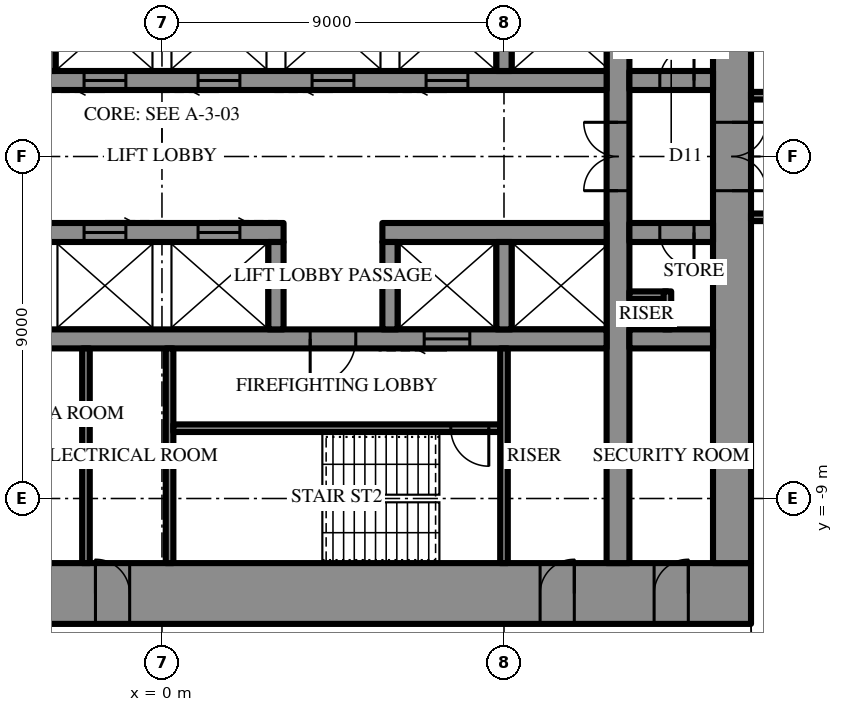
"""IFC4 building model, lengths in metres.
Left out: names, types, materials, properties, quantities, classifications, styles, units other than length and angle.
Written with IfcOpenShell. Run it as: python <this file> out.ifc"""

import sys

from ifc_helpers import new_model, si_unit, direction, frame, frame_2d, origin, place, context, subcontext, project, spatial, rectangle, extrude, element, fill, save


model = new_model("IFC4")
c1 = context("Model", 3, precision=1e-05, world=origin(), true_north=direction((0.0, 1.0)))
c2 = subcontext(c1, "Body", "Model", "MODEL_VIEW")
j1 = project(units=[si_unit("LENGTHUNIT", "METRE"), si_unit("PLANEANGLEUNIT", "RADIAN")], contexts=[c1])
p1 = place(None, origin())
s1 = spatial("IfcSite", under=j1, at=p1, CompositionType="ELEMENT")
p2 = place(p1, origin())
s2 = spatial("IfcBuilding", under=s1, at=p2, CompositionType="ELEMENT")
p3 = place(p2, frame((0.0, 0.0, 291.1)))
s3 = spatial("IfcBuildingStorey", under=s2, at=p3, CompositionType="ELEMENT", Elevation=291.1)
p4 = place(p3, frame((15.5, -11.5, 0.0), z_axis=(0.0, 0.0, 1.0), x_axis=(-1.0, 0.0, 0.0)))
e1 = element("IfcWall", 1, at=p4, inside=s3, PredefinedType="SHEAR", context=c2, shape_type="SweptSolid", body=[
    extrude(rectangle(XDim=31.0, YDim=1.6, at=frame_2d((15.5, 0.0))), origin(), (0.0, 0.0, 1.0), 4.2),
])
p5 = place(p4, frame((16.35, 0.0, 0.0)))
e2 = element("IfcOpeningElement", 2, at=p5, cuts=e1, PredefinedType="OPENING", context=c2, shape_type="SweptSolid", body=[
    extrude(rectangle(XDim=0.9, YDim=2.2, at=frame_2d((0.45, 1.1))), frame((0.0, 0.81, 0.0), z_axis=(0.0, -1.0, 0.0), x_axis=(1.0, 0.0, 0.0)), (0.0, 0.0, 1.0), 1.62),
])
p6 = place(p4, frame((19.35, 0.0, 0.0)))
e3 = element("IfcOpeningElement", 3, at=p6, cuts=e1, PredefinedType="OPENING", context=c2, shape_type="SweptSolid", body=[
    extrude(rectangle(XDim=0.9, YDim=2.2, at=frame_2d((0.45, 1.1))), frame((0.0, 0.81, 0.0), z_axis=(0.0, -1.0, 0.0), x_axis=(1.0, 0.0, 0.0)), (0.0, 0.0, 1.0), 1.62),
])
p7 = place(p4, frame((22.4, 0.0, 0.0)))
e4 = element("IfcOpeningElement", 4, at=p7, cuts=e1, PredefinedType="OPENING", context=c2, shape_type="SweptSolid", body=[
    extrude(rectangle(XDim=1.0, YDim=2.2, at=frame_2d((0.5, 1.1))), frame((0.0, 0.81, 0.0), z_axis=(0.0, -1.0, 0.0), x_axis=(1.0, 0.0, 0.0)), (0.0, 0.0, 1.0), 1.62),
])
p8 = place(p4, frame((1.65, 0.0, 0.0)))
e5 = element("IfcOpeningElement", 5, at=p8, cuts=e1, PredefinedType="OPENING", context=c2, shape_type="SweptSolid", body=[
    extrude(rectangle(XDim=0.9, YDim=2.2, at=frame_2d((0.45, 1.1))), frame((0.0, 0.81, 0.0), z_axis=(0.0, -1.0, 0.0), x_axis=(1.0, 0.0, 0.0)), (0.0, 0.0, 1.0), 1.62),
])
p9 = place(p4, frame((4.65, 0.0, 0.0)))
e6 = element("IfcOpeningElement", 6, at=p9, cuts=e1, PredefinedType="OPENING", context=c2, shape_type="SweptSolid", body=[
    extrude(rectangle(XDim=0.9, YDim=2.2, at=frame_2d((0.45, 1.1))), frame((0.0, 0.81, 0.0), z_axis=(0.0, -1.0, 0.0), x_axis=(1.0, 0.0, 0.0)), (0.0, 0.0, 1.0), 1.62),
])
p10 = place(p4, frame((25.45, 0.0, 0.0)))
e7 = element("IfcOpeningElement", 7, at=p10, cuts=e1, PredefinedType="OPENING", context=c2, shape_type="SweptSolid", body=[
    extrude(rectangle(XDim=0.9, YDim=2.2, at=frame_2d((0.45, 1.1))), frame((0.0, 0.81, 0.0), z_axis=(0.0, -1.0, 0.0), x_axis=(1.0, 0.0, 0.0)), (0.0, 0.0, 1.0), 1.62),
])
p11 = place(p4, frame((28.45, 0.0, 0.0)))
e8 = element("IfcOpeningElement", 8, at=p11, cuts=e1, PredefinedType="OPENING", context=c2, shape_type="SweptSolid", body=[
    extrude(rectangle(XDim=0.9, YDim=2.2, at=frame_2d((0.45, 1.1))), frame((0.0, 0.81, 0.0), z_axis=(0.0, -1.0, 0.0), x_axis=(1.0, 0.0, 0.0)), (0.0, 0.0, 1.0), 1.62),
])
p12 = place(p3, frame((15.0, -10.7, 0.0), z_axis=(0.0, 0.0, 1.0), x_axis=(0.0, 1.0, 0.0)))
e9 = element("IfcWall", 9, at=p12, inside=s3, PredefinedType="SHEAR", context=c2, shape_type="SweptSolid", body=[
    extrude(rectangle(XDim=21.4, YDim=1.0, at=frame_2d((10.7, 0.0))), origin(), (0.0, 0.0, 1.0), 4.2),
])
p13 = place(p12, frame((9.8, 0.0, 0.0)))
e10 = element("IfcOpeningElement", 10, at=p13, cuts=e9, PredefinedType="OPENING", context=c2, shape_type="SweptSolid", body=[
    extrude(rectangle(XDim=1.8, YDim=2.4, at=frame_2d((0.9, 1.2))), frame((0.0, 0.51, 0.0), z_axis=(0.0, -1.0, 0.0), x_axis=(1.0, 0.0, 0.0)), (0.0, 0.0, 1.0), 1.02),
])
p14 = place(p3, frame((12.0, -10.7, 0.0), z_axis=(0.0, 0.0, 1.0), x_axis=(0.0, 1.0, 0.0)))
e11 = element("IfcWall", 11, at=p14, inside=s3, PredefinedType="SHEAR", context=c2, shape_type="SweptSolid", body=[
    extrude(rectangle(XDim=21.4, YDim=0.6, at=frame_2d((10.7, 0.0))), origin(), (0.0, 0.0, 1.0), 4.2),
])
p15 = place(p14, frame((9.8, 0.0, 0.0)))
e12 = element("IfcOpeningElement", 12, at=p15, cuts=e11, PredefinedType="OPENING", context=c2, shape_type="SweptSolid", body=[
    extrude(rectangle(XDim=1.8, YDim=2.4, at=frame_2d((0.9, 1.2))), frame((0.0, 0.31, 0.0), z_axis=(0.0, -1.0, 0.0), x_axis=(1.0, 0.0, 0.0)), (0.0, 0.0, 1.0), 0.62),
])
p16 = place(p3, frame((-3.2, 2.0, 0.0), z_axis=(0.0, 0.0, 1.0), x_axis=(1.0, 0.0, 0.0)))
e13 = element("IfcWall", 13, at=p16, inside=s3, PredefinedType="SHEAR", context=c2, shape_type="SweptSolid", body=[
    extrude(rectangle(XDim=14.9, YDim=0.5, at=frame_2d((7.45, 0.0))), origin(), (0.0, 0.0, 1.0), 4.2),
])
p17 = place(p16, frame((1.15, 0.0, 0.0)))
e14 = element("IfcOpeningElement", 14, at=p17, cuts=e13, PredefinedType="OPENING", context=c2, shape_type="SweptSolid", body=[
    extrude(rectangle(XDim=1.1, YDim=2.2, at=frame_2d((0.55, 1.1))), frame((0.0, 0.26, 0.0), z_axis=(0.0, -1.0, 0.0), x_axis=(1.0, 0.0, 0.0)), (0.0, 0.0, 1.0), 0.52),
])
p18 = place(p16, frame((4.15, 0.0, 0.0)))
e15 = element("IfcOpeningElement", 15, at=p18, cuts=e13, PredefinedType="OPENING", context=c2, shape_type="SweptSolid", body=[
    extrude(rectangle(XDim=1.1, YDim=2.2, at=frame_2d((0.55, 1.1))), frame((0.0, 0.26, 0.0), z_axis=(0.0, -1.0, 0.0), x_axis=(1.0, 0.0, 0.0)), (0.0, 0.0, 1.0), 0.52),
])
p19 = place(p16, frame((7.15, 0.0, 0.0)))
e16 = element("IfcOpeningElement", 16, at=p19, cuts=e13, PredefinedType="OPENING", context=c2, shape_type="SweptSolid", body=[
    extrude(rectangle(XDim=1.1, YDim=2.2, at=frame_2d((0.55, 1.1))), frame((0.0, 0.26, 0.0), z_axis=(0.0, -1.0, 0.0), x_axis=(1.0, 0.0, 0.0)), (0.0, 0.0, 1.0), 0.52),
])
p20 = place(p16, frame((10.15, 0.0, 0.0)))
e17 = element("IfcOpeningElement", 17, at=p20, cuts=e13, PredefinedType="OPENING", context=c2, shape_type="SweptSolid", body=[
    extrude(rectangle(XDim=1.1, YDim=2.2, at=frame_2d((0.55, 1.1))), frame((0.0, 0.26, 0.0), z_axis=(0.0, -1.0, 0.0), x_axis=(1.0, 0.0, 0.0)), (0.0, 0.0, 1.0), 0.52),
])
p21 = place(p3, frame((12.3, 2.0, 0.0), z_axis=(0.0, 0.0, 1.0), x_axis=(1.0, 0.0, 0.0)))
e18 = element("IfcWall", 18, at=p21, inside=s3, PredefinedType="SHEAR", context=c2, shape_type="SweptSolid", body=[
    extrude(rectangle(XDim=2.2, YDim=0.5, at=frame_2d((1.1, 0.0))), origin(), (0.0, 0.0, 1.0), 4.2),
])
p22 = place(p21, frame((0.8, 0.0, 0.0)))
e19 = element("IfcOpeningElement", 19, at=p22, cuts=e18, PredefinedType="OPENING", context=c2, shape_type="SweptSolid", body=[
    extrude(rectangle(XDim=0.9, YDim=2.2, at=frame_2d((0.45, 1.1))), frame((0.0, 0.26, 0.0), z_axis=(0.0, -1.0, 0.0), x_axis=(1.0, 0.0, 0.0)), (0.0, 0.0, 1.0), 0.52),
])
for number, where, z_axis, x_axis in (
    (20, (-3.0, 2.25, 0.0), (0.0, 0.0, 1.0), (0.0, 1.0, 0.0)),
    (21, (9.0, 2.25, 0.0), (0.0, 0.0, 1.0), (0.0, 1.0, 0.0)),
):
    element("IfcWall", number, at=place(p3, frame(where, z_axis=z_axis, x_axis=x_axis)), inside=s3, PredefinedType="SHEAR", context=c2, shape_type="SweptSolid", body=[
        extrude(rectangle(XDim=2.3, YDim=0.4, at=frame_2d((1.15, 0.0))), origin(), (0.0, 0.0, 1.0), 4.2),
    ])
p23 = place(p3, frame((14.5, -2.0, 0.0), z_axis=(0.0, 0.0, 1.0), x_axis=(-1.0, 0.0, 0.0)))
e22 = element("IfcWall", 22, at=p23, inside=s3, PredefinedType="SHEAR", context=c2, shape_type="SweptSolid", body=[
    extrude(rectangle(XDim=2.2, YDim=0.5, at=frame_2d((1.1, 0.0))), origin(), (0.0, 0.0, 1.0), 4.2),
])
p24 = place(p23, frame((0.5, 0.0, 0.0)))
e23 = element("IfcOpeningElement", 23, at=p24, cuts=e22, PredefinedType="OPENING", context=c2, shape_type="SweptSolid", body=[
    extrude(rectangle(XDim=0.9, YDim=2.2, at=frame_2d((0.45, 1.1))), frame((0.0, 0.26, 0.0), z_axis=(0.0, -1.0, 0.0), x_axis=(1.0, 0.0, 0.0)), (0.0, 0.0, 1.0), 0.52),
])
p25 = place(p3, frame((11.7, -2.0, 0.0), z_axis=(0.0, 0.0, 1.0), x_axis=(-1.0, 0.0, 0.0)))
e24 = element("IfcWall", 24, at=p25, inside=s3, PredefinedType="SHEAR", context=c2, shape_type="SweptSolid", body=[
    extrude(rectangle(XDim=5.9, YDim=0.5, at=frame_2d((2.95, 0.0))), origin(), (0.0, 0.0, 1.0), 4.2),
])
p26 = place(p3, frame((3.2, -2.0, 0.0), z_axis=(0.0, 0.0, 1.0), x_axis=(-1.0, 0.0, 0.0)))
e25 = element("IfcWall", 25, at=p26, inside=s3, PredefinedType="SHEAR", context=c2, shape_type="SweptSolid", body=[
    extrude(rectangle(XDim=14.9, YDim=0.5, at=frame_2d((7.45, 0.0))), origin(), (0.0, 0.0, 1.0), 4.2),
])
p27 = place(p26, frame((1.15, 0.0, 0.0)))
e26 = element("IfcOpeningElement", 26, at=p27, cuts=e25, PredefinedType="OPENING", context=c2, shape_type="SweptSolid", body=[
    extrude(rectangle(XDim=1.1, YDim=2.2, at=frame_2d((0.55, 1.1))), frame((0.0, 0.26, 0.0), z_axis=(0.0, -1.0, 0.0), x_axis=(1.0, 0.0, 0.0)), (0.0, 0.0, 1.0), 0.52),
])
p28 = place(p26, frame((4.15, 0.0, 0.0)))
e27 = element("IfcOpeningElement", 27, at=p28, cuts=e25, PredefinedType="OPENING", context=c2, shape_type="SweptSolid", body=[
    extrude(rectangle(XDim=1.1, YDim=2.2, at=frame_2d((0.55, 1.1))), frame((0.0, 0.26, 0.0), z_axis=(0.0, -1.0, 0.0), x_axis=(1.0, 0.0, 0.0)), (0.0, 0.0, 1.0), 0.52),
])
p29 = place(p26, frame((7.15, 0.0, 0.0)))
e28 = element("IfcOpeningElement", 28, at=p29, cuts=e25, PredefinedType="OPENING", context=c2, shape_type="SweptSolid", body=[
    extrude(rectangle(XDim=1.1, YDim=2.2, at=frame_2d((0.55, 1.1))), frame((0.0, 0.26, 0.0), z_axis=(0.0, -1.0, 0.0), x_axis=(1.0, 0.0, 0.0)), (0.0, 0.0, 1.0), 0.52),
])
p30 = place(p26, frame((10.15, 0.0, 0.0)))
e29 = element("IfcOpeningElement", 29, at=p30, cuts=e25, PredefinedType="OPENING", context=c2, shape_type="SweptSolid", body=[
    extrude(rectangle(XDim=1.1, YDim=2.2, at=frame_2d((0.55, 1.1))), frame((0.0, 0.26, 0.0), z_axis=(0.0, -1.0, 0.0), x_axis=(1.0, 0.0, 0.0)), (0.0, 0.0, 1.0), 0.52),
])
p31 = place(p3, frame((14.5, -4.8, 0.0), z_axis=(0.0, 0.0, 1.0), x_axis=(-1.0, 0.0, 0.0)))
e30 = element("IfcWall", 30, at=p31, inside=s3, PredefinedType="SHEAR", context=c2, shape_type="SweptSolid", body=[
    extrude(rectangle(XDim=2.2, YDim=0.5, at=frame_2d((1.1, 0.0))), origin(), (0.0, 0.0, 1.0), 4.2),
])
p32 = place(p3, frame((11.7, -4.8, 0.0), z_axis=(0.0, 0.0, 1.0), x_axis=(-1.0, 0.0, 0.0)))
e31 = element("IfcWall", 31, at=p32, inside=s3, PredefinedType="SHEAR", context=c2, shape_type="SweptSolid", body=[
    extrude(rectangle(XDim=23.4, YDim=0.5, at=frame_2d((11.7, 0.0))), origin(), (0.0, 0.0, 1.0), 4.2),
])
p33 = place(p32, frame((6.6, 0.0, 0.0)))
e32 = element("IfcOpeningElement", 32, at=p33, cuts=e31, PredefinedType="OPENING", context=c2, shape_type="SweptSolid", body=[
    extrude(rectangle(XDim=1.2, YDim=2.2, at=frame_2d((0.6, 1.1))), frame((0.0, 0.26, 0.0), z_axis=(0.0, -1.0, 0.0), x_axis=(1.0, 0.0, 0.0)), (0.0, 0.0, 1.0), 0.52),
])
p34 = place(p32, frame((3.6, 0.0, 0.0)))
e33 = element("IfcOpeningElement", 33, at=p34, cuts=e31, PredefinedType="OPENING", context=c2, shape_type="SweptSolid", body=[
    extrude(rectangle(XDim=1.2, YDim=2.2, at=frame_2d((0.6, 1.1))), frame((0.0, 0.26, 0.0), z_axis=(0.0, -1.0, 0.0), x_axis=(1.0, 0.0, 0.0)), (0.0, 0.0, 1.0), 0.52),
])
for number, where, z_axis, x_axis in (
    (34, (9.0, -2.25, 0.0), (0.0, 0.0, 1.0), (0.0, -1.0, 0.0)),
    (35, (6.0, -2.25, 0.0), (0.0, 0.0, 1.0), (0.0, -1.0, 0.0)),
    (36, (3.0, -2.25, 0.0), (0.0, 0.0, 1.0), (0.0, -1.0, 0.0)),
):
    element("IfcWall", number, at=place(p3, frame(where, z_axis=z_axis, x_axis=x_axis)), inside=s3, PredefinedType="SHEAR", context=c2, shape_type="SweptSolid", body=[
        extrude(rectangle(XDim=2.3, YDim=0.4, at=frame_2d((1.15, 0.0))), origin(), (0.0, 0.0, 1.0), 4.2),
    ])
p35 = place(p3, frame((0.2, -5.05, 0.0), z_axis=(0.0, 0.0, 1.0), x_axis=(0.0, -1.0, 0.0)))
e37 = element("IfcWall", 37, at=p35, inside=s3, PredefinedType="SHEAR", context=c2, shape_type="SweptSolid", body=[
    extrude(rectangle(XDim=5.65, YDim=0.2, at=frame_2d((2.825, 0.0))), origin(), (0.0, 0.0, 1.0), 4.2),
])
p36 = place(p3, frame((8.9, -7.15, 0.0), z_axis=(0.0, 0.0, 1.0), x_axis=(-1.0, 0.0, 0.0)))
e38 = element("IfcWall", 38, at=p36, inside=s3, PredefinedType="SHEAR", context=c2, shape_type="SweptSolid", body=[
    extrude(rectangle(XDim=8.6, YDim=0.2, at=frame_2d((4.3, 0.0))), origin(), (0.0, 0.0, 1.0), 4.2),
])
p37 = place(p36, frame((0.3, 0.0, 0.0)))
e39 = element("IfcOpeningElement", 39, at=p37, cuts=e38, PredefinedType="OPENING", context=c2, shape_type="SweptSolid", body=[
    extrude(rectangle(XDim=1.0, YDim=2.2, at=frame_2d((0.5, 1.1))), frame((0.0, 0.11, 0.0), z_axis=(0.0, -1.0, 0.0), x_axis=(1.0, 0.0, 0.0)), (0.0, 0.0, 1.0), 0.22),
])
for number, where, z_axis, x_axis in (
    (40, (9.0, -5.05, 0.0), (0.0, 0.0, 1.0), (0.0, -1.0, 0.0)),
    (41, (-2.0, -5.05, 0.0), (0.0, 0.0, 1.0), (0.0, -1.0, 0.0)),
):
    element("IfcWall", number, at=place(p3, frame(where, z_axis=z_axis, x_axis=x_axis)), inside=s3, PredefinedType="PARTITIONING", context=c2, shape_type="SweptSolid", body=[
        extrude(rectangle(XDim=5.65, YDim=0.2, at=frame_2d((2.825, 0.0))), origin(), (0.0, 0.0, 1.0), 4.0),
    ])
for number, where, z_axis, x_axis in (
    (42, (13.3, -3.65, 0.0), (0.0, 0.0, 1.0), (-1.0, 0.0, 0.0)),
    (43, (13.3, -3.55, 0.0), (0.0, 0.0, 1.0), (0.0, -1.0, 0.0)),
):
    element("IfcWall", number, at=place(p3, frame(where, z_axis=z_axis, x_axis=x_axis)), inside=s3, PredefinedType="PARTITIONING", context=c2, shape_type="SweptSolid", body=[
        extrude(rectangle(XDim=1.0, YDim=0.2, at=frame_2d((0.5, 0.0))), origin(), (0.0, 0.0, 1.0), 4.0),
    ])
p38 = place(p3, frame((15.5, 1.6, 0.0), z_axis=(0.0, 0.0, 1.0), x_axis=(1.0, 0.0, 0.0)))
e44 = element("IfcWall", 44, at=p38, inside=s3, PredefinedType="PARTITIONING", context=c2, shape_type="SweptSolid", body=[
    extrude(rectangle(XDim=12.2, YDim=0.2, at=frame_2d((6.1, 0.0))), origin(), (0.0, 0.0, 1.0), 4.0),
])
p39 = place(p38, frame((8.04, 0.0, 0.0)))
e45 = element("IfcOpeningElement", 45, at=p39, cuts=e44, PredefinedType="OPENING", context=c2, shape_type="SweptSolid", body=[
    extrude(rectangle(XDim=1.0, YDim=2.2, at=frame_2d((0.5, 1.1))), frame((0.0, 0.11, 0.0), z_axis=(0.0, -1.0, 0.0), x_axis=(1.0, 0.0, 0.0)), (0.0, 0.0, 1.0), 0.22),
])
p40 = place(p3, frame((15.5, -1.6, 0.0), z_axis=(0.0, 0.0, 1.0), x_axis=(1.0, 0.0, 0.0)))
e46 = element("IfcWall", 46, at=p40, inside=s3, PredefinedType="PARTITIONING", context=c2, shape_type="SweptSolid", body=[
    extrude(rectangle(XDim=12.2, YDim=0.2, at=frame_2d((6.1, 0.0))), origin(), (0.0, 0.0, 1.0), 4.0),
])
p41 = place(p40, frame((8.04, 0.0, 0.0)))
e47 = element("IfcOpeningElement", 47, at=p41, cuts=e46, PredefinedType="OPENING", context=c2, shape_type="SweptSolid", body=[
    extrude(rectangle(XDim=1.0, YDim=2.2, at=frame_2d((0.5, 1.1))), frame((0.0, 0.11, 0.0), z_axis=(0.0, -1.0, 0.0), x_axis=(1.0, 0.0, 0.0)), (0.0, 0.0, 1.0), 0.22),
])
p42 = place(p13, frame((1.8, 0.0, 0.0), z_axis=(0.0, 0.0, 1.0), x_axis=(-1.0, 0.0, 0.0)))
e48 = element("IfcDoor", 48, at=p42, inside=s3, OperationType="DOUBLE_DOOR_SINGLE_SWING", PredefinedType="DOOR", context=c2, shape_type="SweptSolid", body=[
    extrude(rectangle(XDim=1.8, YDim=2.4, at=frame_2d((0.9, 1.2))), frame((0.0, 0.025, 0.0), z_axis=(0.0, -1.0, 0.0), x_axis=(1.0, 0.0, 0.0)), (0.0, 0.0, 1.0), 0.05),
])
fill(e10, e48)
p43 = place(p33, origin())
e49 = element("IfcDoor", 49, at=p43, inside=s3, OperationType="SINGLE_SWING_LEFT", PredefinedType="DOOR", context=c2, shape_type="SweptSolid", body=[
    extrude(rectangle(XDim=1.2, YDim=2.2, at=frame_2d((0.6, 1.1))), frame((0.0, 0.025, 0.0), z_axis=(0.0, -1.0, 0.0), x_axis=(1.0, 0.0, 0.0)), (0.0, 0.0, 1.0), 0.05),
])
fill(e32, e49)
p44 = place(p37, origin())
e50 = element("IfcDoor", 50, at=p44, inside=s3, OperationType="SINGLE_SWING_RIGHT", PredefinedType="DOOR", context=c2, shape_type="SweptSolid", body=[
    extrude(rectangle(XDim=1.0, YDim=2.2, at=frame_2d((0.5, 1.1))), frame((0.0, 0.025, 0.0), z_axis=(0.0, -1.0, 0.0), x_axis=(1.0, 0.0, 0.0)), (0.0, 0.0, 1.0), 0.05),
])
fill(e39, e50)
p45 = place(p5, frame((0.9, 0.0, 0.0), z_axis=(0.0, 0.0, 1.0), x_axis=(-1.0, 0.0, 0.0)))
e51 = element("IfcDoor", 51, at=p45, inside=s3, OperationType="SINGLE_SWING_RIGHT", PredefinedType="DOOR", context=c2, shape_type="SweptSolid", body=[
    extrude(rectangle(XDim=0.9, YDim=2.2, at=frame_2d((0.45, 1.1))), frame((0.0, 0.025, 0.0), z_axis=(0.0, -1.0, 0.0), x_axis=(1.0, 0.0, 0.0)), (0.0, 0.0, 1.0), 0.05),
])
fill(e2, e51)
p46 = place(p8, frame((0.9, 0.0, 0.0), z_axis=(0.0, 0.0, 1.0), x_axis=(-1.0, 0.0, 0.0)))
e52 = element("IfcDoor", 52, at=p46, inside=s3, OperationType="SINGLE_SWING_LEFT", PredefinedType="DOOR", context=c2, shape_type="SweptSolid", body=[
    extrude(rectangle(XDim=0.9, YDim=2.2, at=frame_2d((0.45, 1.1))), frame((0.0, 0.025, 0.0), z_axis=(0.0, -1.0, 0.0), x_axis=(1.0, 0.0, 0.0)), (0.0, 0.0, 1.0), 0.05),
])
fill(e5, e52)
p47 = place(p9, frame((0.9, 0.0, 0.0), z_axis=(0.0, 0.0, 1.0), x_axis=(-1.0, 0.0, 0.0)))
e53 = element("IfcDoor", 53, at=p47, inside=s3, OperationType="SINGLE_SWING_LEFT", PredefinedType="DOOR", context=c2, shape_type="SweptSolid", body=[
    extrude(rectangle(XDim=0.9, YDim=2.2, at=frame_2d((0.45, 1.1))), frame((0.0, 0.025, 0.0), z_axis=(0.0, -1.0, 0.0), x_axis=(1.0, 0.0, 0.0)), (0.0, 0.0, 1.0), 0.05),
])
fill(e6, e53)
p48 = place(p22, origin())
e54 = element("IfcDoor", 54, at=p48, inside=s3, OperationType="SINGLE_SWING_LEFT", PredefinedType="DOOR", context=c2, shape_type="SweptSolid", body=[
    extrude(rectangle(XDim=0.9, YDim=2.2, at=frame_2d((0.45, 1.1))), frame((0.0, 0.025, 0.0), z_axis=(0.0, -1.0, 0.0), x_axis=(1.0, 0.0, 0.0)), (0.0, 0.0, 1.0), 0.05),
])
fill(e19, e54)
p49 = place(p24, origin())
e55 = element("IfcDoor", 55, at=p49, inside=s3, OperationType="SINGLE_SWING_RIGHT", PredefinedType="DOOR", context=c2, shape_type="SweptSolid", body=[
    extrude(rectangle(XDim=0.9, YDim=2.2, at=frame_2d((0.45, 1.1))), frame((0.0, 0.025, 0.0), z_axis=(0.0, -1.0, 0.0), x_axis=(1.0, 0.0, 0.0)), (0.0, 0.0, 1.0), 0.05),
])
fill(e23, e55)
p50 = place(p15, origin())
e56 = element("IfcDoor", 56, at=p50, inside=s3, OperationType="DOUBLE_DOOR_SINGLE_SWING", PredefinedType="DOOR", context=c2, shape_type="SweptSolid", body=[
    extrude(rectangle(XDim=1.8, YDim=2.4, at=frame_2d((0.9, 1.2))), frame((0.0, 0.025, 0.0), z_axis=(0.0, -1.0, 0.0), x_axis=(1.0, 0.0, 0.0)), (0.0, 0.0, 1.0), 0.05),
])
fill(e12, e56)
p51 = place(p17, frame((1.1, 0.0, 0.0), z_axis=(0.0, 0.0, 1.0), x_axis=(-1.0, 0.0, 0.0)))
e57 = element("IfcDoor", 57, at=p51, inside=s3, OperationType="SLIDING_TO_LEFT", PredefinedType="DOOR", context=c2, shape_type="SweptSolid", body=[
    extrude(rectangle(XDim=1.1, YDim=2.2, at=frame_2d((0.55, 1.1))), frame((0.0, 0.025, 0.0), z_axis=(0.0, -1.0, 0.0), x_axis=(1.0, 0.0, 0.0)), (0.0, 0.0, 1.0), 0.05),
])
fill(e14, e57)
p52 = place(p18, frame((1.1, 0.0, 0.0), z_axis=(0.0, 0.0, 1.0), x_axis=(-1.0, 0.0, 0.0)))
e58 = element("IfcDoor", 58, at=p52, inside=s3, OperationType="SLIDING_TO_LEFT", PredefinedType="DOOR", context=c2, shape_type="SweptSolid", body=[
    extrude(rectangle(XDim=1.1, YDim=2.2, at=frame_2d((0.55, 1.1))), frame((0.0, 0.025, 0.0), z_axis=(0.0, -1.0, 0.0), x_axis=(1.0, 0.0, 0.0)), (0.0, 0.0, 1.0), 0.05),
])
fill(e15, e58)
p53 = place(p19, frame((1.1, 0.0, 0.0), z_axis=(0.0, 0.0, 1.0), x_axis=(-1.0, 0.0, 0.0)))
e59 = element("IfcDoor", 59, at=p53, inside=s3, OperationType="SLIDING_TO_LEFT", PredefinedType="DOOR", context=c2, shape_type="SweptSolid", body=[
    extrude(rectangle(XDim=1.1, YDim=2.2, at=frame_2d((0.55, 1.1))), frame((0.0, 0.025, 0.0), z_axis=(0.0, -1.0, 0.0), x_axis=(1.0, 0.0, 0.0)), (0.0, 0.0, 1.0), 0.05),
])
fill(e16, e59)
p54 = place(p20, frame((1.1, 0.0, 0.0), z_axis=(0.0, 0.0, 1.0), x_axis=(-1.0, 0.0, 0.0)))
e60 = element("IfcDoor", 60, at=p54, inside=s3, OperationType="SLIDING_TO_LEFT", PredefinedType="DOOR", context=c2, shape_type="SweptSolid", body=[
    extrude(rectangle(XDim=1.1, YDim=2.2, at=frame_2d((0.55, 1.1))), frame((0.0, 0.025, 0.0), z_axis=(0.0, -1.0, 0.0), x_axis=(1.0, 0.0, 0.0)), (0.0, 0.0, 1.0), 0.05),
])
fill(e17, e60)
p55 = place(p34, origin())
e61 = element("IfcDoor", 61, at=p55, inside=s3, OperationType="SLIDING_TO_LEFT", PredefinedType="DOOR", context=c2, shape_type="SweptSolid", body=[
    extrude(rectangle(XDim=1.2, YDim=2.2, at=frame_2d((0.6, 1.1))), frame((0.0, 0.025, 0.0), z_axis=(0.0, -1.0, 0.0), x_axis=(1.0, 0.0, 0.0)), (0.0, 0.0, 1.0), 0.05),
])
fill(e33, e61)
p56 = place(p27, frame((1.1, 0.0, 0.0), z_axis=(0.0, 0.0, 1.0), x_axis=(-1.0, 0.0, 0.0)))
e62 = element("IfcDoor", 62, at=p56, inside=s3, OperationType="SLIDING_TO_LEFT", PredefinedType="DOOR", context=c2, shape_type="SweptSolid", body=[
    extrude(rectangle(XDim=1.1, YDim=2.2, at=frame_2d((0.55, 1.1))), frame((0.0, 0.025, 0.0), z_axis=(0.0, -1.0, 0.0), x_axis=(1.0, 0.0, 0.0)), (0.0, 0.0, 1.0), 0.05),
])
fill(e26, e62)
p57 = place(p28, frame((1.1, 0.0, 0.0), z_axis=(0.0, 0.0, 1.0), x_axis=(-1.0, 0.0, 0.0)))
e63 = element("IfcDoor", 63, at=p57, inside=s3, OperationType="SLIDING_TO_LEFT", PredefinedType="DOOR", context=c2, shape_type="SweptSolid", body=[
    extrude(rectangle(XDim=1.1, YDim=2.2, at=frame_2d((0.55, 1.1))), frame((0.0, 0.025, 0.0), z_axis=(0.0, -1.0, 0.0), x_axis=(1.0, 0.0, 0.0)), (0.0, 0.0, 1.0), 0.05),
])
fill(e27, e63)
save(model, sys.argv[1])
